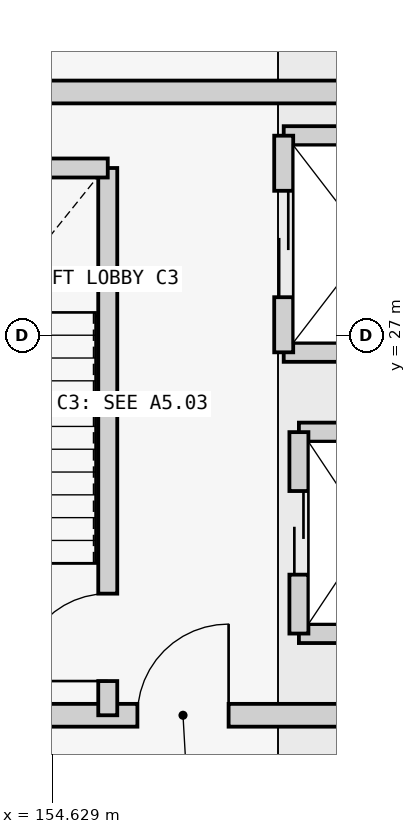
"""IFC4 building model, lengths in metres.
Left out: names, types, materials, properties, quantities, classifications, styles, units other than length and angle.
Written with IfcOpenShell. Run it as: python <this file> out.ifc"""

import sys

from ifc_helpers import new_model, si_unit, direction, frame, frame_2d, origin, place, context, subcontext, project, spatial, rectangle, extrude, element, fill, save


model = new_model("IFC4")
c1 = context("Model", 3, precision=1e-05, world=origin(), true_north=direction((0.0, 1.0)))
c2 = subcontext(c1, "Body", "Model", "MODEL_VIEW")
j1 = project(units=[si_unit("LENGTHUNIT", "METRE"), si_unit("PLANEANGLEUNIT", "RADIAN")], contexts=[c1])
p1 = place(None, origin())
s1 = spatial("IfcSite", under=j1, at=p1, CompositionType="ELEMENT")
p2 = place(p1, origin())
s2 = spatial("IfcBuilding", under=s1, at=p2, CompositionType="ELEMENT")
p3 = place(p2, frame((0.0, 0.0, 16.8)))
s3 = spatial("IfcBuildingStorey", under=s2, at=p3, CompositionType="ELEMENT", Elevation=16.8)
p4 = place(p3, frame((151.0, 22.0, 0.0), z_axis=(0.0, 0.0, 1.0), x_axis=(1.0, 0.0, 0.0)))
e1 = element("IfcWall", 1, at=p4, inside=s3, PredefinedType="SHEAR", context=c2, shape_type="SweptSolid", body=[
    extrude(rectangle(XDim=10.2, YDim=0.3, at=frame_2d((5.1, 0.0))), origin(), (0.0, 0.0, 1.0), 3.955),
])
p5 = place(p4, frame((4.75, 0.0, 0.0)))
e2 = element("IfcOpeningElement", 2, at=p5, cuts=e1, PredefinedType="OPENING", context=c2, shape_type="SweptSolid", body=[
    extrude(rectangle(XDim=1.2, YDim=2.15, at=frame_2d((0.6, 1.075))), frame((0.0, 0.16, 0.0), z_axis=(0.0, -1.0, 0.0), x_axis=(1.0, 0.0, 0.0)), (0.0, 0.0, 1.0), 0.32),
])
p6 = place(p3, frame((161.2, 30.2, 0.0), z_axis=(0.0, 0.0, 1.0), x_axis=(-1.0, 0.0, 0.0)))
e3 = element("IfcWall", 3, at=p6, inside=s3, PredefinedType="SHEAR", context=c2, shape_type="SweptSolid", body=[
    extrude(rectangle(XDim=10.2, YDim=0.3, at=frame_2d((5.1, 0.0))), origin(), (0.0, 0.0, 1.0), 3.955),
])
p7 = place(p3, frame((155.36, 22.0, 0.0), z_axis=(0.0, 0.0, 1.0), x_axis=(0.0, 1.0, 0.0)))
e4 = element("IfcWall", 4, at=p7, inside=s3, PredefinedType="SHEAR", context=c2, shape_type="SweptSolid", body=[
    extrude(rectangle(XDim=7.2, YDim=0.25, at=frame_2d((3.6, 0.0))), origin(), (0.0, 0.0, 1.0), 3.955),
])
p8 = place(p7, frame((0.45, 0.0, 0.0)))
e5 = element("IfcOpeningElement", 5, at=p8, cuts=e4, PredefinedType="OPENING", context=c2, shape_type="SweptSolid", body=[
    extrude(rectangle(XDim=1.15, YDim=2.15, at=frame_2d((0.575, 1.075))), frame((0.0, 0.135, 0.0), z_axis=(0.0, -1.0, 0.0), x_axis=(1.0, 0.0, 0.0)), (0.0, 0.0, 1.0), 0.27),
])
p9 = place(p3, frame((151.0, 29.2, 0.0), z_axis=(0.0, 0.0, 1.0), x_axis=(1.0, 0.0, 0.0)))
e6 = element("IfcWall", 6, at=p9, inside=s3, PredefinedType="SHEAR", context=c2, shape_type="SweptSolid", body=[
    extrude(rectangle(XDim=4.36, YDim=0.25, at=frame_2d((2.18, 0.0))), origin(), (0.0, 0.0, 1.0), 3.955),
])
for number, where, z_axis, x_axis in (
    (7, (157.875, 23.075, 0.0), (0.0, 0.0, 1.0), (1.0, 0.0, 0.0)),
    (8, (157.875, 25.725, 0.0), (0.0, 0.0, 1.0), (1.0, 0.0, 0.0)),
):
    element("IfcWall", number, at=place(p3, frame(where, z_axis=z_axis, x_axis=x_axis)), inside=s3, PredefinedType="SHEAR", context=c2, shape_type="SweptSolid", body=[
        extrude(rectangle(XDim=1.85, YDim=0.25, at=frame_2d((0.925, 0.0))), origin(), (0.0, 0.0, 1.0), 3.955),
    ])
p10 = place(p3, frame((157.875, 23.075, 0.0), z_axis=(0.0, 0.0, 1.0), x_axis=(0.0, 1.0, 0.0)))
e9 = element("IfcWall", 9, at=p10, inside=s3, PredefinedType="SHEAR", context=c2, shape_type="SweptSolid", body=[
    extrude(rectangle(XDim=2.65, YDim=0.25, at=frame_2d((1.325, 0.0))), origin(), (0.0, 0.0, 1.0), 3.955),
])
p11 = place(p10, frame((0.775, 0.0, 0.0)))
e10 = element("IfcOpeningElement", 10, at=p11, cuts=e9, PredefinedType="OPENING", context=c2, shape_type="SweptSolid", body=[
    extrude(rectangle(XDim=1.1, YDim=2.15, at=frame_2d((0.55, 1.075))), frame((0.0, 0.135, 0.0), z_axis=(0.0, -1.0, 0.0), x_axis=(1.0, 0.0, 0.0)), (0.0, 0.0, 1.0), 0.27),
])
for number, where, z_axis, x_axis in (
    (11, (157.675, 26.775, 0.0), (0.0, 0.0, 1.0), (1.0, 0.0, 0.0)),
    (12, (157.675, 29.625, 0.0), (0.0, 0.0, 1.0), (1.0, 0.0, 0.0)),
):
    element("IfcWall", number, at=place(p3, frame(where, z_axis=z_axis, x_axis=x_axis)), inside=s3, PredefinedType="SHEAR", context=c2, shape_type="SweptSolid", body=[
        extrude(rectangle(XDim=2.25, YDim=0.25, at=frame_2d((1.125, 0.0))), origin(), (0.0, 0.0, 1.0), 3.955),
    ])
p12 = place(p3, frame((157.675, 26.775, 0.0), z_axis=(0.0, 0.0, 1.0), x_axis=(0.0, 1.0, 0.0)))
e13 = element("IfcWall", 13, at=p12, inside=s3, PredefinedType="SHEAR", context=c2, shape_type="SweptSolid", body=[
    extrude(rectangle(XDim=2.85, YDim=0.25, at=frame_2d((1.425, 0.0))), origin(), (0.0, 0.0, 1.0), 3.955),
])
p13 = place(p12, frame((0.725, 0.0, 0.0)))
e14 = element("IfcOpeningElement", 14, at=p13, cuts=e13, PredefinedType="OPENING", context=c2, shape_type="SweptSolid", body=[
    extrude(rectangle(XDim=1.4, YDim=2.2, at=frame_2d((0.7, 1.1))), frame((0.0, 0.135, 0.0), z_axis=(0.0, -1.0, 0.0), x_axis=(1.0, 0.0, 0.0)), (0.0, 0.0, 1.0), 0.27),
])
p14 = place(p8, origin())
e15 = element("IfcDoor", 15, at=p14, inside=s3, OperationType="SINGLE_SWING_LEFT", PredefinedType="DOOR", context=c2, shape_type="SweptSolid", body=[
    extrude(rectangle(XDim=1.15, YDim=2.15, at=frame_2d((0.575, 1.075))), frame((0.0, 0.025, 0.0), z_axis=(0.0, -1.0, 0.0), x_axis=(1.0, 0.0, 0.0)), (0.0, 0.0, 1.0), 0.05),
])
fill(e5, e15)
p15 = place(p5, origin())
e16 = element("IfcDoor", 16, at=p15, inside=s3, OperationType="SINGLE_SWING_RIGHT", PredefinedType="DOOR", context=c2, shape_type="SweptSolid", body=[
    extrude(rectangle(XDim=1.2, YDim=2.15, at=frame_2d((0.6, 1.075))), frame((0.0, 0.025, 0.0), z_axis=(0.0, -1.0, 0.0), x_axis=(1.0, 0.0, 0.0)), (0.0, 0.0, 1.0), 0.05),
])
fill(e2, e16)
p16 = place(p11, origin())
e17 = element("IfcDoor", 17, at=p16, inside=s3, OperationType="DOUBLE_DOOR_SLIDING", PredefinedType="USERDEFINED", context=c2, shape_type="SweptSolid", body=[
    extrude(rectangle(XDim=1.1, YDim=2.15, at=frame_2d((0.55, 1.075))), frame((0.0, 0.025, 0.0), z_axis=(0.0, -1.0, 0.0), x_axis=(1.0, 0.0, 0.0)), (0.0, 0.0, 1.0), 0.05),
])
fill(e10, e17)
p17 = place(p13, origin())
e18 = element("IfcDoor", 18, at=p17, inside=s3, OperationType="DOUBLE_DOOR_SLIDING", PredefinedType="USERDEFINED", context=c2, shape_type="SweptSolid", body=[
    extrude(rectangle(XDim=1.4, YDim=2.2, at=frame_2d((0.7, 1.1))), frame((0.0, 0.025, 0.0), z_axis=(0.0, -1.0, 0.0), x_axis=(1.0, 0.0, 0.0)), (0.0, 0.0, 1.0), 0.05),
])
fill(e14, e18)
save(model, sys.argv[1])
